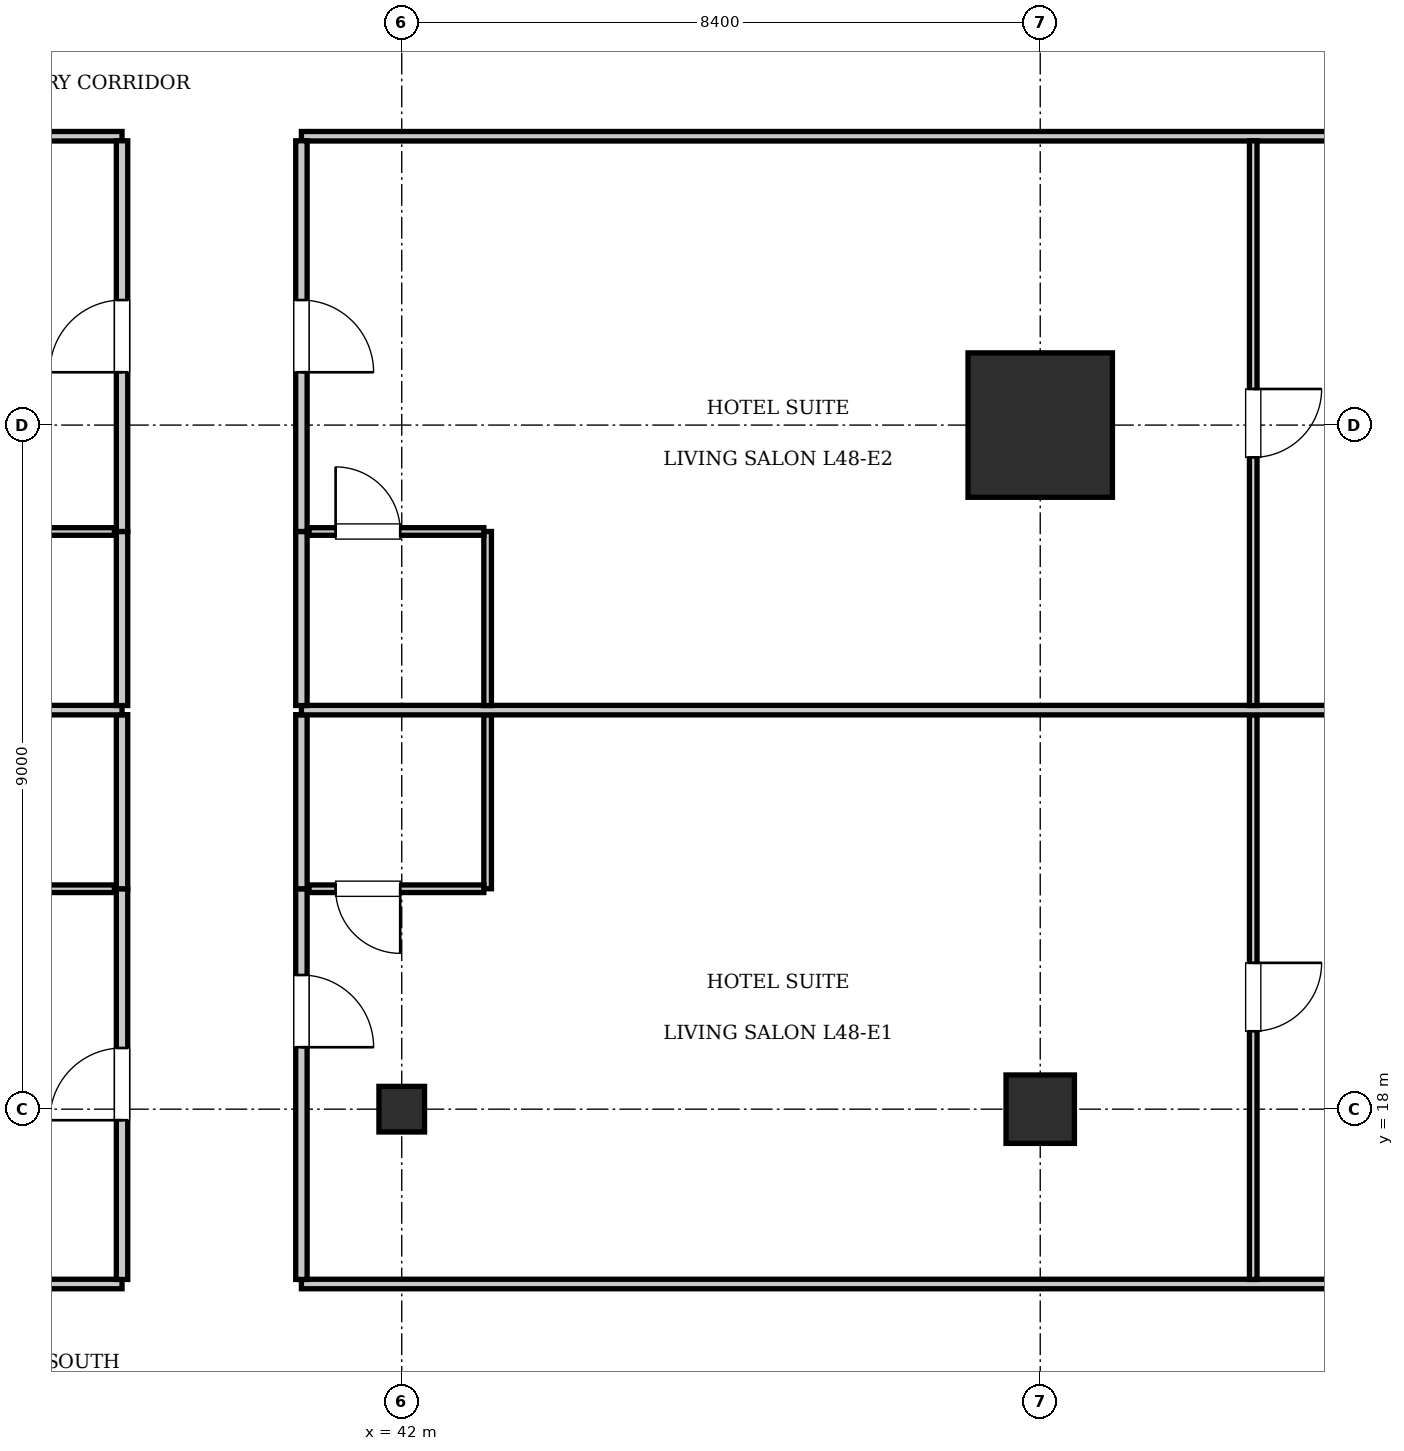
"""IFC4 building model, lengths in metres.
Left out: names, types, materials, properties, quantities, classifications, styles, units other than length and angle.
Written with IfcOpenShell. Run it as: python <this file> out.ifc"""

import sys

from ifc_helpers import new_model, si_unit, direction, frame, frame_2d, origin, origin_2d, place, context, subcontext, project, spatial, rectangle, i_section, extrude, element, fill, save


model = new_model("IFC4")
c1 = context("Model", 3, precision=1e-05, world=origin(), true_north=direction((0.0, 1.0)))
c2 = subcontext(c1, "Body", "Model", "MODEL_VIEW")
j1 = project(units=[si_unit("LENGTHUNIT", "METRE"), si_unit("PLANEANGLEUNIT", "RADIAN")], contexts=[c1])
p1 = place(None, origin())
s1 = spatial("IfcSite", under=j1, at=p1, CompositionType="ELEMENT")
p2 = place(p1, origin())
s2 = spatial("IfcBuilding", under=s1, at=p2, CompositionType="ELEMENT")
p3 = place(p2, frame((0.0, 0.0, 196.7)))
s3 = spatial("IfcBuildingStorey", under=s2, at=p3, CompositionType="ELEMENT", Elevation=196.7)
p4 = place(p3, frame((50.4, 27.0, 0.0), z_axis=(0.0, 0.0, 1.0), x_axis=(1.0, 0.0, 0.0)))
e1 = element("IfcColumn", 1, at=p4, inside=s3, PredefinedType="COLUMN", context=c2, shape_type="SweptSolid", body=[
    extrude(rectangle(XDim=1.9, YDim=1.9, at=origin_2d()), origin(), (0.0, 0.0, 1.0), 3.85),
])
p5 = place(p3, frame((50.4, 18.0, 0.0), z_axis=(0.0, 0.0, 1.0), x_axis=(1.0, 0.0, 0.0)))
e2 = element("IfcColumn", 2, at=p5, inside=s3, PredefinedType="COLUMN", context=c2, shape_type="SweptSolid", body=[
    extrude(rectangle(XDim=0.9, YDim=0.9, at=origin_2d()), origin(), (0.0, 0.0, 1.0), 3.85),
])
p6 = place(p3, frame((42.0, 18.0, 0.0), z_axis=(0.0, 0.0, 1.0), x_axis=(1.0, 0.0, 0.0)))
e3 = element("IfcColumn", 3, at=p6, inside=s3, PredefinedType="COLUMN", context=c2, shape_type="SweptSolid", body=[
    extrude(i_section(OverallWidth=0.6, OverallDepth=0.6, WebThickness=0.025, FlangeThickness=0.038, at=origin_2d()), origin(), (0.0, 0.0, 1.0), 3.85),
])
p7 = place(p3, frame((13.2, 15.7, 0.0), z_axis=(0.0, 0.0, 1.0), x_axis=(1.0, 0.0, 0.0)))
e4 = element("IfcWall", 4, at=p7, inside=s3, PredefinedType="PARTITIONING", context=c2, shape_type="SweptSolid", body=[
    extrude(rectangle(XDim=25.12, YDim=0.125, at=frame_2d((12.56, 0.0))), origin(), (0.0, 0.0, 1.0), 3.61),
])
p8 = place(p3, frame((40.68, 15.7, 0.0), z_axis=(0.0, 0.0, 1.0), x_axis=(1.0, 0.0, 0.0)))
e5 = element("IfcWall", 5, at=p8, inside=s3, PredefinedType="PARTITIONING", context=c2, shape_type="SweptSolid", body=[
    extrude(rectangle(XDim=21.72, YDim=0.125, at=frame_2d((10.86, 0.0))), origin(), (0.0, 0.0, 1.0), 3.61),
])
p9 = place(p3, frame((13.2, 30.8, 0.0), z_axis=(0.0, 0.0, 1.0), x_axis=(1.0, 0.0, 0.0)))
e6 = element("IfcWall", 6, at=p9, inside=s3, PredefinedType="PARTITIONING", context=c2, shape_type="SweptSolid", body=[
    extrude(rectangle(XDim=25.12, YDim=0.125, at=frame_2d((12.56, 0.0))), origin(), (0.0, 0.0, 1.0), 3.61),
])
p10 = place(p3, frame((40.68, 30.8, 0.0), z_axis=(0.0, 0.0, 1.0), x_axis=(1.0, 0.0, 0.0)))
e7 = element("IfcWall", 7, at=p10, inside=s3, PredefinedType="PARTITIONING", context=c2, shape_type="SweptSolid", body=[
    extrude(rectangle(XDim=21.72, YDim=0.125, at=frame_2d((10.86, 0.0))), origin(), (0.0, 0.0, 1.0), 3.61),
])
p11 = place(p3, frame((38.32, 15.76, 0.0), z_axis=(0.0, 0.0, 1.0), x_axis=(0.0, 1.0, 0.0)))
e8 = element("IfcWall", 8, at=p11, inside=s3, PredefinedType="PARTITIONING", context=c2, shape_type="SweptSolid", body=[
    extrude(rectangle(XDim=5.14, YDim=0.15, at=frame_2d((2.57, 0.0))), origin(), (0.0, 0.0, 1.0), 3.61),
])
p12 = place(p11, frame((2.095, 0.0, 0.0)))
e9 = element("IfcOpeningElement", 9, at=p12, cuts=e8, PredefinedType="OPENING", context=c2, shape_type="SweptSolid", body=[
    extrude(rectangle(XDim=0.95, YDim=2.15, at=frame_2d((0.475, 1.075))), frame((0.0, 0.085, 0.0), z_axis=(0.0, -1.0, 0.0), x_axis=(1.0, 0.0, 0.0)), (0.0, 0.0, 1.0), 0.17),
])
p13 = place(p3, frame((38.32, 20.9, 0.0), z_axis=(0.0, 0.0, 1.0), x_axis=(0.0, 1.0, 0.0)))
e10 = element("IfcWall", 10, at=p13, inside=s3, PredefinedType="PARTITIONING", context=c2, shape_type="SweptSolid", body=[
    extrude(rectangle(XDim=2.29, YDim=0.15, at=frame_2d((1.145, 0.0))), origin(), (0.0, 0.0, 1.0), 3.61),
])
p14 = place(p3, frame((35.92, 20.9, 0.0), z_axis=(0.0, 0.0, 1.0), x_axis=(1.0, 0.0, 0.0)))
e11 = element("IfcWall", 11, at=p14, inside=s3, PredefinedType="PARTITIONING", context=c2, shape_type="SweptSolid", body=[
    extrude(rectangle(XDim=2.3, YDim=0.1, at=frame_2d((1.15, 0.0))), origin(), (0.0, 0.0, 1.0), 3.61),
])
p15 = place(p14, frame((0.35, 0.0, 0.0)))
e12 = element("IfcOpeningElement", 12, at=p15, cuts=e11, PredefinedType="OPENING", context=c2, shape_type="SweptSolid", body=[
    extrude(rectangle(XDim=0.85, YDim=2.1, at=frame_2d((0.425, 1.05))), frame((0.0, 0.06, 0.0), z_axis=(0.0, -1.0, 0.0), x_axis=(1.0, 0.0, 0.0)), (0.0, 0.0, 1.0), 0.12),
])
p16 = place(p3, frame((40.68, 15.76, 0.0), z_axis=(0.0, 0.0, 1.0), x_axis=(0.0, 1.0, 0.0)))
e13 = element("IfcWall", 13, at=p16, inside=s3, PredefinedType="PARTITIONING", context=c2, shape_type="SweptSolid", body=[
    extrude(rectangle(XDim=5.14, YDim=0.15, at=frame_2d((2.57, 0.0))), origin(), (0.0, 0.0, 1.0), 3.61),
])
p17 = place(p16, frame((3.055, 0.0, 0.0)))
e14 = element("IfcOpeningElement", 14, at=p17, cuts=e13, PredefinedType="OPENING", context=c2, shape_type="SweptSolid", body=[
    extrude(rectangle(XDim=0.95, YDim=2.15, at=frame_2d((0.475, 1.075))), frame((0.0, 0.085, 0.0), z_axis=(0.0, -1.0, 0.0), x_axis=(1.0, 0.0, 0.0)), (0.0, 0.0, 1.0), 0.17),
])
p18 = place(p3, frame((40.68, 20.9, 0.0), z_axis=(0.0, 0.0, 1.0), x_axis=(0.0, 1.0, 0.0)))
e15 = element("IfcWall", 15, at=p18, inside=s3, PredefinedType="PARTITIONING", context=c2, shape_type="SweptSolid", body=[
    extrude(rectangle(XDim=2.29, YDim=0.15, at=frame_2d((1.145, 0.0))), origin(), (0.0, 0.0, 1.0), 3.61),
])
p19 = place(p3, frame((43.13, 20.9, 0.0), z_axis=(0.0, 0.0, 1.0), x_axis=(0.0, 1.0, 0.0)))
e16 = element("IfcWall", 16, at=p19, inside=s3, PredefinedType="PARTITIONING", context=c2, shape_type="SweptSolid", body=[
    extrude(rectangle(XDim=2.29, YDim=0.1, at=frame_2d((1.145, 0.0))), origin(), (0.0, 0.0, 1.0), 3.61),
])
p20 = place(p3, frame((40.78, 20.9, 0.0), z_axis=(0.0, 0.0, 1.0), x_axis=(1.0, 0.0, 0.0)))
e17 = element("IfcWall", 17, at=p20, inside=s3, PredefinedType="PARTITIONING", context=c2, shape_type="SweptSolid", body=[
    extrude(rectangle(XDim=2.3, YDim=0.1, at=frame_2d((1.15, 0.0))), origin(), (0.0, 0.0, 1.0), 3.61),
])
p21 = place(p20, frame((0.35, 0.0, 0.0)))
e18 = element("IfcOpeningElement", 18, at=p21, cuts=e17, PredefinedType="OPENING", context=c2, shape_type="SweptSolid", body=[
    extrude(rectangle(XDim=0.85, YDim=2.1, at=frame_2d((0.425, 1.05))), frame((0.0, 0.06, 0.0), z_axis=(0.0, -1.0, 0.0), x_axis=(1.0, 0.0, 0.0)), (0.0, 0.0, 1.0), 0.12),
])
p22 = place(p3, frame((53.202, 15.76, 0.0), z_axis=(0.0, 0.0, 1.0), x_axis=(0.0, 1.0, 0.0)))
e19 = element("IfcWall", 19, at=p22, inside=s3, PredefinedType="PARTITIONING", context=c2, shape_type="SweptSolid", body=[
    extrude(rectangle(XDim=7.43, YDim=0.1, at=frame_2d((3.715, 0.0))), origin(), (0.0, 0.0, 1.0), 3.61),
])
p23 = place(p22, frame((3.265, 0.0, 0.0)))
e20 = element("IfcOpeningElement", 20, at=p23, cuts=e19, PredefinedType="OPENING", context=c2, shape_type="SweptSolid", body=[
    extrude(rectangle(XDim=0.9, YDim=2.1, at=frame_2d((0.45, 1.05))), frame((0.0, 0.06, 0.0), z_axis=(0.0, -1.0, 0.0), x_axis=(1.0, 0.0, 0.0)), (0.0, 0.0, 1.0), 0.12),
])
p24 = place(p3, frame((13.2, 23.25, 0.0), z_axis=(0.0, 0.0, 1.0), x_axis=(1.0, 0.0, 0.0)))
e21 = element("IfcWall", 21, at=p24, inside=s3, PredefinedType="PARTITIONING", context=c2, shape_type="SweptSolid", body=[
    extrude(rectangle(XDim=25.12, YDim=0.125, at=frame_2d((12.56, 0.0))), origin(), (0.0, 0.0, 1.0), 3.61),
])
p25 = place(p3, frame((40.68, 23.25, 0.0), z_axis=(0.0, 0.0, 1.0), x_axis=(1.0, 0.0, 0.0)))
e22 = element("IfcWall", 22, at=p25, inside=s3, PredefinedType="PARTITIONING", context=c2, shape_type="SweptSolid", body=[
    extrude(rectangle(XDim=21.72, YDim=0.125, at=frame_2d((10.86, 0.0))), origin(), (0.0, 0.0, 1.0), 3.61),
])
p26 = place(p3, frame((38.32, 23.31, 0.0), z_axis=(0.0, 0.0, 1.0), x_axis=(0.0, 1.0, 0.0)))
e23 = element("IfcWall", 23, at=p26, inside=s3, PredefinedType="PARTITIONING", context=c2, shape_type="SweptSolid", body=[
    extrude(rectangle(XDim=2.29, YDim=0.15, at=frame_2d((1.145, 0.0))), origin(), (0.0, 0.0, 1.0), 3.61),
])
p27 = place(p3, frame((38.32, 25.6, 0.0), z_axis=(0.0, 0.0, 1.0), x_axis=(0.0, 1.0, 0.0)))
e24 = element("IfcWall", 24, at=p27, inside=s3, PredefinedType="PARTITIONING", context=c2, shape_type="SweptSolid", body=[
    extrude(rectangle(XDim=5.14, YDim=0.15, at=frame_2d((2.57, 0.0))), origin(), (0.0, 0.0, 1.0), 3.61),
])
p28 = place(p27, frame((2.095, 0.0, 0.0)))
e25 = element("IfcOpeningElement", 25, at=p28, cuts=e24, PredefinedType="OPENING", context=c2, shape_type="SweptSolid", body=[
    extrude(rectangle(XDim=0.95, YDim=2.15, at=frame_2d((0.475, 1.075))), frame((0.0, 0.085, 0.0), z_axis=(0.0, -1.0, 0.0), x_axis=(1.0, 0.0, 0.0)), (0.0, 0.0, 1.0), 0.17),
])
p29 = place(p3, frame((35.92, 25.6, 0.0), z_axis=(0.0, 0.0, 1.0), x_axis=(1.0, 0.0, 0.0)))
e26 = element("IfcWall", 26, at=p29, inside=s3, PredefinedType="PARTITIONING", context=c2, shape_type="SweptSolid", body=[
    extrude(rectangle(XDim=2.3, YDim=0.1, at=frame_2d((1.15, 0.0))), origin(), (0.0, 0.0, 1.0), 3.61),
])
p30 = place(p29, frame((0.35, 0.0, 0.0)))
e27 = element("IfcOpeningElement", 27, at=p30, cuts=e26, PredefinedType="OPENING", context=c2, shape_type="SweptSolid", body=[
    extrude(rectangle(XDim=0.85, YDim=2.1, at=frame_2d((0.425, 1.05))), frame((0.0, 0.06, 0.0), z_axis=(0.0, -1.0, 0.0), x_axis=(1.0, 0.0, 0.0)), (0.0, 0.0, 1.0), 0.12),
])
p31 = place(p3, frame((40.68, 23.31, 0.0), z_axis=(0.0, 0.0, 1.0), x_axis=(0.0, 1.0, 0.0)))
e28 = element("IfcWall", 28, at=p31, inside=s3, PredefinedType="PARTITIONING", context=c2, shape_type="SweptSolid", body=[
    extrude(rectangle(XDim=2.29, YDim=0.15, at=frame_2d((1.145, 0.0))), origin(), (0.0, 0.0, 1.0), 3.61),
])
p32 = place(p3, frame((40.68, 25.6, 0.0), z_axis=(0.0, 0.0, 1.0), x_axis=(0.0, 1.0, 0.0)))
e29 = element("IfcWall", 29, at=p32, inside=s3, PredefinedType="PARTITIONING", context=c2, shape_type="SweptSolid", body=[
    extrude(rectangle(XDim=5.14, YDim=0.15, at=frame_2d((2.57, 0.0))), origin(), (0.0, 0.0, 1.0), 3.61),
])
p33 = place(p32, frame((2.095, 0.0, 0.0)))
e30 = element("IfcOpeningElement", 30, at=p33, cuts=e29, PredefinedType="OPENING", context=c2, shape_type="SweptSolid", body=[
    extrude(rectangle(XDim=0.95, YDim=2.15, at=frame_2d((0.475, 1.075))), frame((0.0, 0.085, 0.0), z_axis=(0.0, -1.0, 0.0), x_axis=(1.0, 0.0, 0.0)), (0.0, 0.0, 1.0), 0.17),
])
p34 = place(p3, frame((43.13, 23.31, 0.0), z_axis=(0.0, 0.0, 1.0), x_axis=(0.0, 1.0, 0.0)))
e31 = element("IfcWall", 31, at=p34, inside=s3, PredefinedType="PARTITIONING", context=c2, shape_type="SweptSolid", body=[
    extrude(rectangle(XDim=2.29, YDim=0.1, at=frame_2d((1.145, 0.0))), origin(), (0.0, 0.0, 1.0), 3.61),
])
p35 = place(p3, frame((40.78, 25.6, 0.0), z_axis=(0.0, 0.0, 1.0), x_axis=(1.0, 0.0, 0.0)))
e32 = element("IfcWall", 32, at=p35, inside=s3, PredefinedType="PARTITIONING", context=c2, shape_type="SweptSolid", body=[
    extrude(rectangle(XDim=2.3, YDim=0.1, at=frame_2d((1.15, 0.0))), origin(), (0.0, 0.0, 1.0), 3.61),
])
p36 = place(p35, frame((0.35, 0.0, 0.0)))
e33 = element("IfcOpeningElement", 33, at=p36, cuts=e32, PredefinedType="OPENING", context=c2, shape_type="SweptSolid", body=[
    extrude(rectangle(XDim=0.85, YDim=2.1, at=frame_2d((0.425, 1.05))), frame((0.0, 0.06, 0.0), z_axis=(0.0, -1.0, 0.0), x_axis=(1.0, 0.0, 0.0)), (0.0, 0.0, 1.0), 0.12),
])
p37 = place(p3, frame((53.202, 23.31, 0.0), z_axis=(0.0, 0.0, 1.0), x_axis=(0.0, 1.0, 0.0)))
e34 = element("IfcWall", 34, at=p37, inside=s3, PredefinedType="PARTITIONING", context=c2, shape_type="SweptSolid", body=[
    extrude(rectangle(XDim=7.43, YDim=0.1, at=frame_2d((3.715, 0.0))), origin(), (0.0, 0.0, 1.0), 3.61),
])
p38 = place(p37, frame((3.265, 0.0, 0.0)))
e35 = element("IfcOpeningElement", 35, at=p38, cuts=e34, PredefinedType="OPENING", context=c2, shape_type="SweptSolid", body=[
    extrude(rectangle(XDim=0.9, YDim=2.1, at=frame_2d((0.45, 1.05))), frame((0.0, 0.06, 0.0), z_axis=(0.0, -1.0, 0.0), x_axis=(1.0, 0.0, 0.0)), (0.0, 0.0, 1.0), 0.12),
])
p39 = place(p12, origin())
e36 = element("IfcDoor", 36, at=p39, inside=s3, OperationType="SINGLE_SWING_LEFT", PredefinedType="DOOR", context=c2, shape_type="SweptSolid", body=[
    extrude(rectangle(XDim=0.95, YDim=2.15, at=frame_2d((0.475, 1.075))), frame((0.0, 0.025, 0.0), z_axis=(0.0, -1.0, 0.0), x_axis=(1.0, 0.0, 0.0)), (0.0, 0.0, 1.0), 0.05),
])
fill(e9, e36)
p40 = place(p21, frame((0.85, 0.0, 0.0), z_axis=(0.0, 0.0, 1.0), x_axis=(-1.0, 0.0, 0.0)))
e37 = element("IfcDoor", 37, at=p40, inside=s3, OperationType="SINGLE_SWING_LEFT", PredefinedType="DOOR", context=c2, shape_type="SweptSolid", body=[
    extrude(rectangle(XDim=0.85, YDim=2.1, at=frame_2d((0.425, 1.05))), frame((0.0, 0.025, 0.0), z_axis=(0.0, -1.0, 0.0), x_axis=(1.0, 0.0, 0.0)), (0.0, 0.0, 1.0), 0.05),
])
fill(e18, e37)
p41 = place(p17, frame((0.95, 0.0, 0.0), z_axis=(0.0, 0.0, 1.0), x_axis=(-1.0, 0.0, 0.0)))
e38 = element("IfcDoor", 38, at=p41, inside=s3, OperationType="SINGLE_SWING_RIGHT", PredefinedType="DOOR", context=c2, shape_type="SweptSolid", body=[
    extrude(rectangle(XDim=0.95, YDim=2.15, at=frame_2d((0.475, 1.075))), frame((0.0, 0.025, 0.0), z_axis=(0.0, -1.0, 0.0), x_axis=(1.0, 0.0, 0.0)), (0.0, 0.0, 1.0), 0.05),
])
fill(e14, e38)
p42 = place(p23, frame((0.9, 0.0, 0.0), z_axis=(0.0, 0.0, 1.0), x_axis=(-1.0, 0.0, 0.0)))
e39 = element("IfcDoor", 39, at=p42, inside=s3, OperationType="SINGLE_SWING_LEFT", PredefinedType="DOOR", context=c2, shape_type="SweptSolid", body=[
    extrude(rectangle(XDim=0.9, YDim=2.1, at=frame_2d((0.45, 1.05))), frame((0.0, 0.025, 0.0), z_axis=(0.0, -1.0, 0.0), x_axis=(1.0, 0.0, 0.0)), (0.0, 0.0, 1.0), 0.05),
])
fill(e20, e39)
p43 = place(p28, origin())
e40 = element("IfcDoor", 40, at=p43, inside=s3, OperationType="SINGLE_SWING_LEFT", PredefinedType="DOOR", context=c2, shape_type="SweptSolid", body=[
    extrude(rectangle(XDim=0.95, YDim=2.15, at=frame_2d((0.475, 1.075))), frame((0.0, 0.025, 0.0), z_axis=(0.0, -1.0, 0.0), x_axis=(1.0, 0.0, 0.0)), (0.0, 0.0, 1.0), 0.05),
])
fill(e25, e40)
p44 = place(p36, origin())
e41 = element("IfcDoor", 41, at=p44, inside=s3, OperationType="SINGLE_SWING_LEFT", PredefinedType="DOOR", context=c2, shape_type="SweptSolid", body=[
    extrude(rectangle(XDim=0.85, YDim=2.1, at=frame_2d((0.425, 1.05))), frame((0.0, 0.025, 0.0), z_axis=(0.0, -1.0, 0.0), x_axis=(1.0, 0.0, 0.0)), (0.0, 0.0, 1.0), 0.05),
])
fill(e33, e41)
p45 = place(p33, frame((0.95, 0.0, 0.0), z_axis=(0.0, 0.0, 1.0), x_axis=(-1.0, 0.0, 0.0)))
e42 = element("IfcDoor", 42, at=p45, inside=s3, OperationType="SINGLE_SWING_RIGHT", PredefinedType="DOOR", context=c2, shape_type="SweptSolid", body=[
    extrude(rectangle(XDim=0.95, YDim=2.15, at=frame_2d((0.475, 1.075))), frame((0.0, 0.025, 0.0), z_axis=(0.0, -1.0, 0.0), x_axis=(1.0, 0.0, 0.0)), (0.0, 0.0, 1.0), 0.05),
])
fill(e30, e42)
p46 = place(p38, frame((0.9, 0.0, 0.0), z_axis=(0.0, 0.0, 1.0), x_axis=(-1.0, 0.0, 0.0)))
e43 = element("IfcDoor", 43, at=p46, inside=s3, OperationType="SINGLE_SWING_LEFT", PredefinedType="DOOR", context=c2, shape_type="SweptSolid", body=[
    extrude(rectangle(XDim=0.9, YDim=2.1, at=frame_2d((0.45, 1.05))), frame((0.0, 0.025, 0.0), z_axis=(0.0, -1.0, 0.0), x_axis=(1.0, 0.0, 0.0)), (0.0, 0.0, 1.0), 0.05),
])
fill(e35, e43)
save(model, sys.argv[1])
